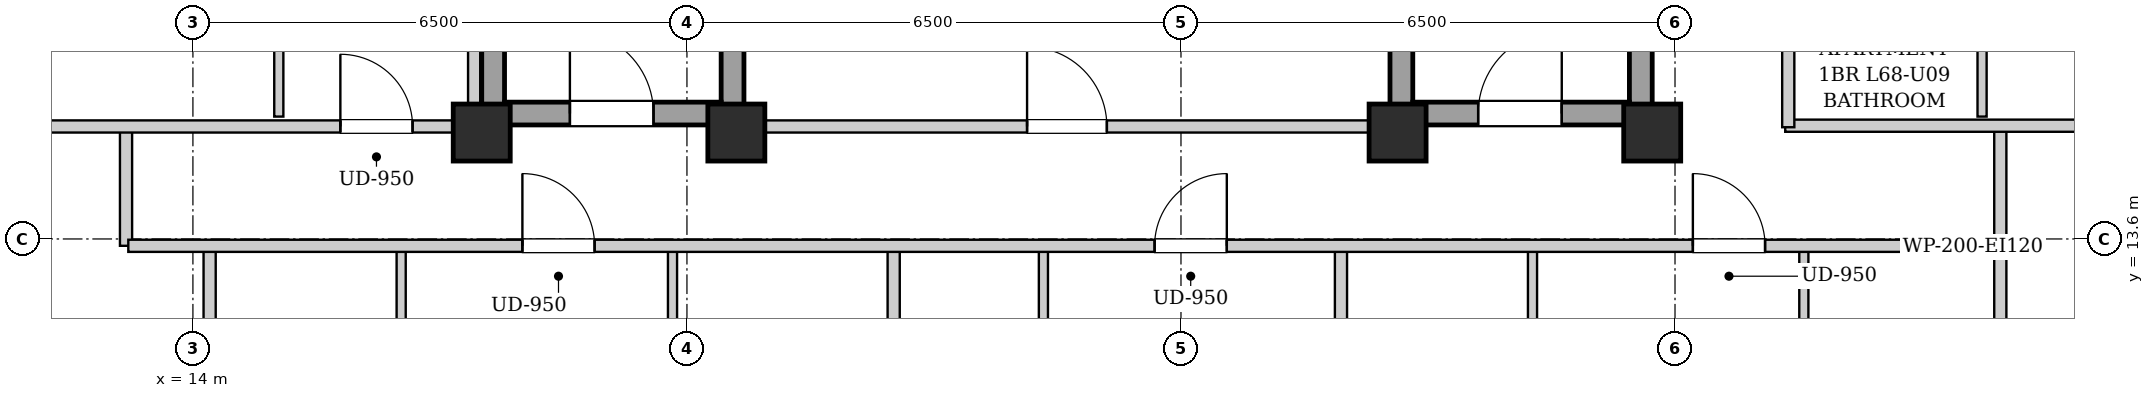
"""IFC4 building model, lengths in metres.
Left out: names, types, materials, properties, quantities, classifications, styles, units other than length and angle.
Written with IfcOpenShell. Run it as: python <this file> out.ifc"""

import sys

from ifc_helpers import new_model, si_unit, direction, frame, frame_2d, origin, origin_2d, place, context, subcontext, project, spatial, rectangle, extrude, element, fill, save


model = new_model("IFC4")
c1 = context("Model", 3, precision=1e-05, world=origin(), true_north=direction((0.0, 1.0)))
c2 = subcontext(c1, "Body", "Model", "MODEL_VIEW")
j1 = project(units=[si_unit("LENGTHUNIT", "METRE"), si_unit("PLANEANGLEUNIT", "RADIAN")], contexts=[c1])
p1 = place(None, origin())
s1 = spatial("IfcSite", under=j1, at=p1, CompositionType="ELEMENT")
p2 = place(p1, origin())
s2 = spatial("IfcBuilding", under=s1, at=p2, CompositionType="ELEMENT")
p3 = place(p2, frame((0.0, 0.0, 234.3)))
s3 = spatial("IfcBuildingStorey", under=s2, at=p3, CompositionType="ELEMENT", Elevation=234.3)
for number, where, z_axis, x_axis in (
    (1, (17.8, 15.0, 0.0), (0.0, 0.0, 1.0), (1.0, 0.0, 0.0)),
    (2, (21.15, 15.0, 0.0), (0.0, 0.0, 1.0), (1.0, 0.0, 0.0)),
    (3, (29.85, 15.0, 0.0), (0.0, 0.0, 1.0), (1.0, 0.0, 0.0)),
    (4, (33.2, 15.0, 0.0), (0.0, 0.0, 1.0), (1.0, 0.0, 0.0)),
):
    element("IfcColumn", number, at=place(p3, frame(where, z_axis=z_axis, x_axis=x_axis)), inside=s3, PredefinedType="COLUMN", context=c2, shape_type="SweptSolid", body=[
        extrude(rectangle(XDim=0.75, YDim=0.75, at=origin_2d()), origin(), (0.0, 0.0, 1.0), 3.4),
    ])
for number, where, z_axis, x_axis in (
    (5, (17.95, 15.1, 0.0), (0.0, 0.0, 1.0), (0.0, 1.0, 0.0)),
    (6, (21.1, 15.1, 0.0), (0.0, 0.0, 1.0), (0.0, 1.0, 0.0)),
):
    element("IfcWall", number, at=place(p3, frame(where, z_axis=z_axis, x_axis=x_axis)), inside=s3, PredefinedType="SHEAR", context=c2, shape_type="SweptSolid", body=[
        extrude(rectangle(XDim=9.0, YDim=0.3, at=frame_2d((4.5, 0.0))), origin(), (0.0, 0.0, 1.0), 3.14),
    ])
p4 = place(p3, frame((18.1, 15.25, 0.0), z_axis=(0.0, 0.0, 1.0), x_axis=(1.0, 0.0, 0.0)))
e7 = element("IfcWall", 7, at=p4, inside=s3, PredefinedType="SHEAR", context=c2, shape_type="SweptSolid", body=[
    extrude(rectangle(XDim=2.85, YDim=0.3, at=frame_2d((1.425, 0.0))), origin(), (0.0, 0.0, 1.0), 3.14),
])
p5 = place(p4, frame((0.86, 0.0, 0.0)))
e8 = element("IfcOpeningElement", 8, at=p5, cuts=e7, PredefinedType="OPENING", context=c2, shape_type="SweptSolid", body=[
    extrude(rectangle(XDim=1.1, YDim=2.05, at=frame_2d((0.55, 1.025))), frame((0.0, 0.16, 0.0), z_axis=(0.0, -1.0, 0.0), x_axis=(1.0, 0.0, 0.0)), (0.0, 0.0, 1.0), 0.32),
])
for number, where, z_axis, x_axis in (
    (9, (29.9, 15.1, 0.0), (0.0, 0.0, 1.0), (0.0, 1.0, 0.0)),
    (10, (33.05, 15.1, 0.0), (0.0, 0.0, 1.0), (0.0, 1.0, 0.0)),
):
    element("IfcWall", number, at=place(p3, frame(where, z_axis=z_axis, x_axis=x_axis)), inside=s3, PredefinedType="SHEAR", context=c2, shape_type="SweptSolid", body=[
        extrude(rectangle(XDim=9.0, YDim=0.3, at=frame_2d((4.5, 0.0))), origin(), (0.0, 0.0, 1.0), 3.14),
    ])
p6 = place(p3, frame((30.05, 15.25, 0.0), z_axis=(0.0, 0.0, 1.0), x_axis=(1.0, 0.0, 0.0)))
e11 = element("IfcWall", 11, at=p6, inside=s3, PredefinedType="SHEAR", context=c2, shape_type="SweptSolid", body=[
    extrude(rectangle(XDim=2.85, YDim=0.3, at=frame_2d((1.425, 0.0))), origin(), (0.0, 0.0, 1.0), 3.14),
])
p7 = place(p6, frame((0.86, 0.0, 0.0)))
e12 = element("IfcOpeningElement", 12, at=p7, cuts=e11, PredefinedType="OPENING", context=c2, shape_type="SweptSolid", body=[
    extrude(rectangle(XDim=1.1, YDim=2.05, at=frame_2d((0.55, 1.025))), frame((0.0, 0.16, 0.0), z_axis=(0.0, -1.0, 0.0), x_axis=(1.0, 0.0, 0.0)), (0.0, 0.0, 1.0), 0.32),
])
p8 = place(p3, frame((21.25, 15.08, 0.0), z_axis=(0.0, 0.0, 1.0), x_axis=(1.0, 0.0, 0.0)))
e13 = element("IfcWall", 13, at=p8, inside=s3, PredefinedType="PARTITIONING", context=c2, shape_type="SweptSolid", body=[
    extrude(rectangle(XDim=8.5, YDim=0.16, at=frame_2d((4.25, 0.0))), origin(), (0.0, 0.0, 1.0), 2.668),
])
p9 = place(p8, frame((3.725, 0.0, 0.0)))
e14 = element("IfcOpeningElement", 14, at=p9, cuts=e13, PredefinedType="OPENING", context=c2, shape_type="SweptSolid", body=[
    extrude(rectangle(XDim=1.05, YDim=2.05, at=frame_2d((0.525, 1.025))), frame((0.0, 0.09, 0.0), z_axis=(0.0, -1.0, 0.0), x_axis=(1.0, 0.0, 0.0)), (0.0, 0.0, 1.0), 0.18),
])
for number, where, z_axis, x_axis in (
    (15, (13.12, 13.51, 0.0), (0.0, 0.0, 1.0), (0.0, 1.0, 0.0)),
    (16, (37.78, 13.51, 0.0), (0.0, 0.0, 1.0), (0.0, 1.0, 0.0)),
):
    element("IfcWall", number, at=place(p3, frame(where, z_axis=z_axis, x_axis=x_axis)), inside=s3, PredefinedType="PARTITIONING", context=c2, shape_type="SweptSolid", body=[
        extrude(rectangle(XDim=1.58, YDim=0.16, at=frame_2d((0.79, 0.0))), origin(), (0.0, 0.0, 1.0), 3.14),
    ])
p10 = place(p3, frame((34.95, 15.09, 0.0), z_axis=(0.0, 0.0, 1.0), x_axis=(1.0, 0.0, 0.0)))
e17 = element("IfcWall", 17, at=p10, inside=s3, PredefinedType="PARTITIONING", context=c2, shape_type="SweptSolid", body=[
    extrude(rectangle(XDim=5.07, YDim=0.16, at=frame_2d((2.535, 0.0))), origin(), (0.0, 0.0, 1.0), 2.668),
])
p11 = place(p3, frame((14.22, 4.08, 0.0), z_axis=(0.0, 0.0, 1.0), x_axis=(0.0, 1.0, 0.0)))
e18 = element("IfcWall", 18, at=p11, inside=s3, PredefinedType="PARTITIONING", context=c2, shape_type="SweptSolid", body=[
    extrude(rectangle(XDim=9.39, YDim=0.16, at=frame_2d((4.695, 0.0))), origin(), (0.0, 0.0, 1.0), 3.14),
])
p12 = place(p3, frame((16.74, 10.62, 0.0), z_axis=(0.0, 0.0, 1.0), x_axis=(0.0, 1.0, 0.0)))
e19 = element("IfcWall", 19, at=p12, inside=s3, PredefinedType="PARTITIONING", context=c2, shape_type="SweptSolid", body=[
    extrude(rectangle(XDim=2.85, YDim=0.12, at=frame_2d((1.425, 0.0))), origin(), (0.0, 0.0, 1.0), 3.14),
])
p13 = place(p12, frame((0.995, 0.0, 0.0)))
e20 = element("IfcOpeningElement", 20, at=p13, cuts=e19, PredefinedType="OPENING", context=c2, shape_type="SweptSolid", body=[
    extrude(rectangle(XDim=0.86, YDim=2.05, at=frame_2d((0.43, 1.025))), frame((0.0, 0.07, 0.0), z_axis=(0.0, -1.0, 0.0), x_axis=(1.0, 0.0, 0.0)), (0.0, 0.0, 1.0), 0.14),
])
p14 = place(p3, frame((20.31, 10.62, 0.0), z_axis=(0.0, 0.0, 1.0), x_axis=(0.0, 1.0, 0.0)))
e21 = element("IfcWall", 21, at=p14, inside=s3, PredefinedType="PARTITIONING", context=c2, shape_type="SweptSolid", body=[
    extrude(rectangle(XDim=2.85, YDim=0.12, at=frame_2d((1.425, 0.0))), origin(), (0.0, 0.0, 1.0), 3.14),
])
p15 = place(p14, frame((0.975, 0.0, 0.0)))
e22 = element("IfcOpeningElement", 22, at=p15, cuts=e21, PredefinedType="OPENING", context=c2, shape_type="SweptSolid", body=[
    extrude(rectangle(XDim=0.9, YDim=2.05, at=frame_2d((0.45, 1.025))), frame((0.0, 0.07, 0.0), z_axis=(0.0, -1.0, 0.0), x_axis=(1.0, 0.0, 0.0)), (0.0, 0.0, 1.0), 0.14),
])
p16 = place(p3, frame((23.22, 4.08, 0.0), z_axis=(0.0, 0.0, 1.0), x_axis=(0.0, 1.0, 0.0)))
e23 = element("IfcWall", 23, at=p16, inside=s3, PredefinedType="PARTITIONING", context=c2, shape_type="SweptSolid", body=[
    extrude(rectangle(XDim=9.39, YDim=0.16, at=frame_2d((4.695, 0.0))), origin(), (0.0, 0.0, 1.0), 3.14),
])
p17 = place(p3, frame((25.19, 10.62, 0.0), z_axis=(0.0, 0.0, 1.0), x_axis=(0.0, 1.0, 0.0)))
e24 = element("IfcWall", 24, at=p17, inside=s3, PredefinedType="PARTITIONING", context=c2, shape_type="SweptSolid", body=[
    extrude(rectangle(XDim=2.85, YDim=0.12, at=frame_2d((1.425, 0.0))), origin(), (0.0, 0.0, 1.0), 3.14),
])
p18 = place(p17, frame((0.995, 0.0, 0.0)))
e25 = element("IfcOpeningElement", 25, at=p18, cuts=e24, PredefinedType="OPENING", context=c2, shape_type="SweptSolid", body=[
    extrude(rectangle(XDim=0.86, YDim=2.05, at=frame_2d((0.43, 1.025))), frame((0.0, 0.07, 0.0), z_axis=(0.0, -1.0, 0.0), x_axis=(1.0, 0.0, 0.0)), (0.0, 0.0, 1.0), 0.14),
])
p19 = place(p3, frame((37.78, 10.56, 0.0), z_axis=(0.0, 0.0, 1.0), x_axis=(0.0, 1.0, 0.0)))
e26 = element("IfcWall", 26, at=p19, inside=s3, PredefinedType="PARTITIONING", context=c2, shape_type="SweptSolid", body=[
    extrude(rectangle(XDim=2.91, YDim=0.16, at=frame_2d((1.455, 0.0))), origin(), (0.0, 0.0, 1.0), 3.14),
])
p20 = place(p3, frame((29.105, 4.08, 0.0), z_axis=(0.0, 0.0, 1.0), x_axis=(0.0, 1.0, 0.0)))
e27 = element("IfcWall", 27, at=p20, inside=s3, PredefinedType="PARTITIONING", context=c2, shape_type="SweptSolid", body=[
    extrude(rectangle(XDim=9.39, YDim=0.16, at=frame_2d((4.695, 0.0))), origin(), (0.0, 0.0, 1.0), 3.14),
])
p21 = place(p3, frame((31.625, 10.62, 0.0), z_axis=(0.0, 0.0, 1.0), x_axis=(0.0, 1.0, 0.0)))
e28 = element("IfcWall", 28, at=p21, inside=s3, PredefinedType="PARTITIONING", context=c2, shape_type="SweptSolid", body=[
    extrude(rectangle(XDim=2.85, YDim=0.12, at=frame_2d((1.425, 0.0))), origin(), (0.0, 0.0, 1.0), 3.14),
])
p22 = place(p21, frame((0.995, 0.0, 0.0)))
e29 = element("IfcOpeningElement", 29, at=p22, cuts=e28, PredefinedType="OPENING", context=c2, shape_type="SweptSolid", body=[
    extrude(rectangle(XDim=0.86, YDim=2.05, at=frame_2d((0.43, 1.025))), frame((0.0, 0.07, 0.0), z_axis=(0.0, -1.0, 0.0), x_axis=(1.0, 0.0, 0.0)), (0.0, 0.0, 1.0), 0.14),
])
p23 = place(p3, frame((35.195, 10.62, 0.0), z_axis=(0.0, 0.0, 1.0), x_axis=(0.0, 1.0, 0.0)))
e30 = element("IfcWall", 30, at=p23, inside=s3, PredefinedType="PARTITIONING", context=c2, shape_type="SweptSolid", body=[
    extrude(rectangle(XDim=2.85, YDim=0.12, at=frame_2d((1.425, 0.0))), origin(), (0.0, 0.0, 1.0), 3.14),
])
p24 = place(p23, frame((0.975, 0.0, 0.0)))
e31 = element("IfcOpeningElement", 31, at=p24, cuts=e30, PredefinedType="OPENING", context=c2, shape_type="SweptSolid", body=[
    extrude(rectangle(XDim=0.9, YDim=2.05, at=frame_2d((0.45, 1.025))), frame((0.0, 0.07, 0.0), z_axis=(0.0, -1.0, 0.0), x_axis=(1.0, 0.0, 0.0)), (0.0, 0.0, 1.0), 0.14),
])
p25 = place(p3, frame((10.88, 15.08, 0.0), z_axis=(0.0, 0.0, 1.0), x_axis=(1.0, 0.0, 0.0)))
e32 = element("IfcWall", 32, at=p25, inside=s3, PredefinedType="PARTITIONING", context=c2, shape_type="SweptSolid", body=[
    extrude(rectangle(XDim=6.88, YDim=0.16, at=frame_2d((3.44, 0.0))), origin(), (0.0, 0.0, 1.0), 2.668),
])
p26 = place(p25, frame((5.06, 0.0, 0.0)))
e33 = element("IfcOpeningElement", 33, at=p26, cuts=e32, PredefinedType="OPENING", context=c2, shape_type="SweptSolid", body=[
    extrude(rectangle(XDim=0.95, YDim=2.1, at=frame_2d((0.475, 1.05))), frame((0.0, 0.09, 0.0), z_axis=(0.0, -1.0, 0.0), x_axis=(1.0, 0.0, 0.0)), (0.0, 0.0, 1.0), 0.18),
])
p27 = place(p3, frame((15.13, 15.21, 0.0), z_axis=(0.0, 0.0, 1.0), x_axis=(0.0, 1.0, 0.0)))
e34 = element("IfcWall", 34, at=p27, inside=s3, PredefinedType="PARTITIONING", context=c2, shape_type="SweptSolid", body=[
    extrude(rectangle(XDim=4.5, YDim=0.12, at=frame_2d((2.25, 0.0))), origin(), (0.0, 0.0, 1.0), 3.14),
])
p28 = place(p27, frame((1.8, 0.0, 0.0)))
e35 = element("IfcOpeningElement", 35, at=p28, cuts=e34, PredefinedType="OPENING", context=c2, shape_type="SweptSolid", body=[
    extrude(rectangle(XDim=0.9, YDim=2.05, at=frame_2d((0.45, 1.025))), frame((0.0, 0.07, 0.0), z_axis=(0.0, -1.0, 0.0), x_axis=(1.0, 0.0, 0.0)), (0.0, 0.0, 1.0), 0.14),
])
p29 = place(p3, frame((37.54, 15.21, 0.0), z_axis=(0.0, 0.0, 1.0), x_axis=(0.0, 1.0, 0.0)))
e36 = element("IfcWall", 36, at=p29, inside=s3, PredefinedType="PARTITIONING", context=c2, shape_type="SweptSolid", body=[
    extrude(rectangle(XDim=2.159, YDim=0.12, at=frame_2d((1.08, 0.0))), origin(), (0.0, 0.0, 1.0), 3.14),
])
p30 = place(p3, frame((13.15, 13.51, 0.0), z_axis=(0.0, 0.0, 1.0), x_axis=(1.0, 0.0, 0.0)))
e37 = element("IfcWall", 37, at=p30, inside=s3, PredefinedType="PARTITIONING", context=c2, shape_type="SweptSolid", body=[
    extrude(rectangle(XDim=24.6, YDim=0.16, at=frame_2d((12.3, 0.0))), origin(), (0.0, 0.0, 1.0), 3.14),
])
p31 = place(p30, frame((5.185, 0.0, 0.0)))
e38 = element("IfcOpeningElement", 38, at=p31, cuts=e37, PredefinedType="OPENING", context=c2, shape_type="SweptSolid", body=[
    extrude(rectangle(XDim=0.95, YDim=2.1, at=frame_2d((0.475, 1.05))), frame((0.0, 0.09, 0.0), z_axis=(0.0, -1.0, 0.0), x_axis=(1.0, 0.0, 0.0)), (0.0, 0.0, 1.0), 0.18),
])
p32 = place(p30, frame((13.503, 0.0, 0.0)))
e39 = element("IfcOpeningElement", 39, at=p32, cuts=e37, PredefinedType="OPENING", context=c2, shape_type="SweptSolid", body=[
    extrude(rectangle(XDim=0.95, YDim=2.1, at=frame_2d((0.475, 1.05))), frame((0.0, 0.09, 0.0), z_axis=(0.0, -1.0, 0.0), x_axis=(1.0, 0.0, 0.0)), (0.0, 0.0, 1.0), 0.18),
])
p33 = place(p30, frame((20.585, 0.0, 0.0)))
e40 = element("IfcOpeningElement", 40, at=p33, cuts=e37, PredefinedType="OPENING", context=c2, shape_type="SweptSolid", body=[
    extrude(rectangle(XDim=0.95, YDim=2.1, at=frame_2d((0.475, 1.05))), frame((0.0, 0.09, 0.0), z_axis=(0.0, -1.0, 0.0), x_axis=(1.0, 0.0, 0.0)), (0.0, 0.0, 1.0), 0.18),
])
p34 = place(p3, frame((17.7, 15.02, 0.0), z_axis=(0.0, 0.0, 1.0), x_axis=(0.0, 1.0, 0.0)))
e41 = element("IfcWall", 41, at=p34, inside=s3, PredefinedType="PARTITIONING", context=c2, shape_type="SweptSolid", body=[
    extrude(rectangle(XDim=13.98, YDim=0.16, at=frame_2d((6.99, 0.0))), origin(), (0.0, 0.0, 1.0), 3.14),
])
p35 = place(p3, frame((34.99, 15.07, 0.0), z_axis=(0.0, 0.0, 1.0), x_axis=(0.0, 1.0, 0.0)))
e42 = element("IfcWall", 42, at=p35, inside=s3, PredefinedType="PARTITIONING", context=c2, shape_type="SweptSolid", body=[
    extrude(rectangle(XDim=13.93, YDim=0.16, at=frame_2d((6.965, 0.0))), origin(), (0.0, 0.0, 1.0), 3.14),
])
p36 = place(p35, frame((4.661, 0.0, 0.0)))
e43 = element("IfcOpeningElement", 43, at=p36, cuts=e42, PredefinedType="OPENING", context=c2, shape_type="SweptSolid", body=[
    extrude(rectangle(XDim=0.95, YDim=2.1, at=frame_2d((0.475, 1.05))), frame((0.0, 0.09, 0.0), z_axis=(0.0, -1.0, 0.0), x_axis=(1.0, 0.0, 0.0)), (0.0, 0.0, 1.0), 0.18),
])
p37 = place(p35, frame((11.411, 0.0, 0.0)))
e44 = element("IfcOpeningElement", 44, at=p37, cuts=e42, PredefinedType="OPENING", context=c2, shape_type="SweptSolid", body=[
    extrude(rectangle(XDim=0.95, YDim=2.1, at=frame_2d((0.475, 1.05))), frame((0.0, 0.09, 0.0), z_axis=(0.0, -1.0, 0.0), x_axis=(1.0, 0.0, 0.0)), (0.0, 0.0, 1.0), 0.18),
])
p38 = place(p5, origin())
e45 = element("IfcDoor", 45, at=p38, inside=s3, OperationType="SINGLE_SWING_LEFT", PredefinedType="DOOR", context=c2, shape_type="SweptSolid", body=[
    extrude(rectangle(XDim=1.1, YDim=2.05, at=frame_2d((0.55, 1.025))), frame((0.0, 0.025, 0.0), z_axis=(0.0, -1.0, 0.0), x_axis=(1.0, 0.0, 0.0)), (0.0, 0.0, 1.0), 0.05),
])
fill(e8, e45)
p39 = place(p7, origin())
e46 = element("IfcDoor", 46, at=p39, inside=s3, OperationType="SINGLE_SWING_RIGHT", PredefinedType="DOOR", context=c2, shape_type="SweptSolid", body=[
    extrude(rectangle(XDim=1.1, YDim=2.05, at=frame_2d((0.55, 1.025))), frame((0.0, 0.025, 0.0), z_axis=(0.0, -1.0, 0.0), x_axis=(1.0, 0.0, 0.0)), (0.0, 0.0, 1.0), 0.05),
])
fill(e12, e46)
p40 = place(p9, origin())
e47 = element("IfcDoor", 47, at=p40, inside=s3, OperationType="SINGLE_SWING_LEFT", PredefinedType="DOOR", context=c2, shape_type="SweptSolid", body=[
    extrude(rectangle(XDim=1.05, YDim=2.05, at=frame_2d((0.525, 1.025))), frame((0.0, 0.025, 0.0), z_axis=(0.0, -1.0, 0.0), x_axis=(1.0, 0.0, 0.0)), (0.0, 0.0, 1.0), 0.05),
])
fill(e14, e47)
p41 = place(p26, origin())
e48 = element("IfcDoor", 48, at=p41, inside=s3, OperationType="SINGLE_SWING_LEFT", PredefinedType="DOOR", context=c2, shape_type="SweptSolid", body=[
    extrude(rectangle(XDim=0.95, YDim=2.1, at=frame_2d((0.475, 1.05))), frame((0.0, 0.025, 0.0), z_axis=(0.0, -1.0, 0.0), x_axis=(1.0, 0.0, 0.0)), (0.0, 0.0, 1.0), 0.05),
])
fill(e33, e48)
p42 = place(p31, origin())
e49 = element("IfcDoor", 49, at=p42, inside=s3, OperationType="SINGLE_SWING_LEFT", PredefinedType="DOOR", context=c2, shape_type="SweptSolid", body=[
    extrude(rectangle(XDim=0.95, YDim=2.1, at=frame_2d((0.475, 1.05))), frame((0.0, 0.025, 0.0), z_axis=(0.0, -1.0, 0.0), x_axis=(1.0, 0.0, 0.0)), (0.0, 0.0, 1.0), 0.05),
])
fill(e38, e49)
p43 = place(p32, origin())
e50 = element("IfcDoor", 50, at=p43, inside=s3, OperationType="SINGLE_SWING_RIGHT", PredefinedType="DOOR", context=c2, shape_type="SweptSolid", body=[
    extrude(rectangle(XDim=0.95, YDim=2.1, at=frame_2d((0.475, 1.05))), frame((0.0, 0.025, 0.0), z_axis=(0.0, -1.0, 0.0), x_axis=(1.0, 0.0, 0.0)), (0.0, 0.0, 1.0), 0.05),
])
fill(e39, e50)
p44 = place(p33, origin())
e51 = element("IfcDoor", 51, at=p44, inside=s3, OperationType="SINGLE_SWING_LEFT", PredefinedType="DOOR", context=c2, shape_type="SweptSolid", body=[
    extrude(rectangle(XDim=0.95, YDim=2.1, at=frame_2d((0.475, 1.05))), frame((0.0, 0.025, 0.0), z_axis=(0.0, -1.0, 0.0), x_axis=(1.0, 0.0, 0.0)), (0.0, 0.0, 1.0), 0.05),
])
fill(e40, e51)
save(model, sys.argv[1])
